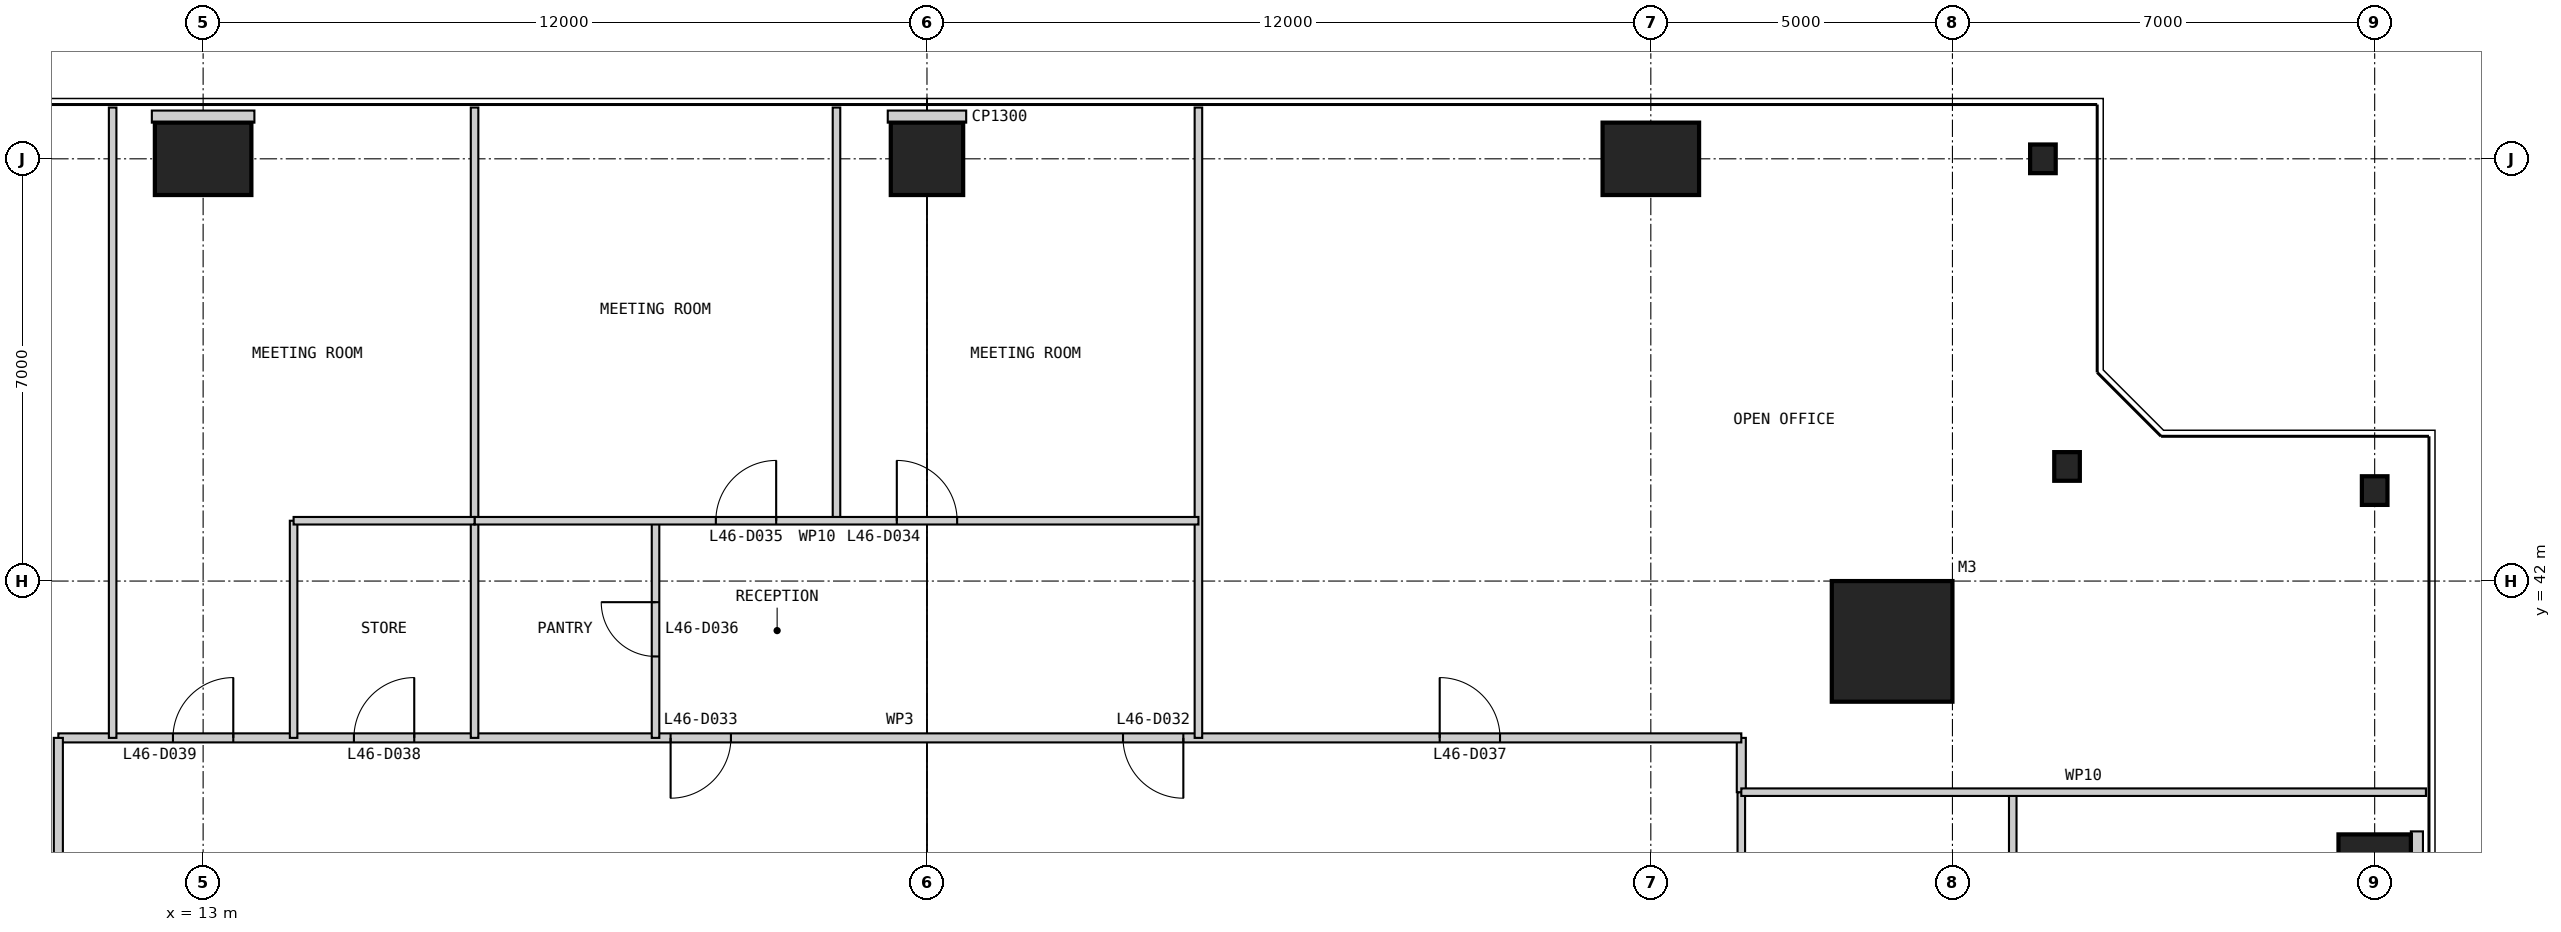
"""IFC4 building model, lengths in metres.
Left out: names, types, materials, properties, quantities, classifications, styles, units other than length and angle.
Written with IfcOpenShell. Run it as: python <this file> out.ifc"""

import sys

from ifc_helpers import new_model, si_unit, direction, frame, frame_2d, origin, origin_2d, place, context, subcontext, project, spatial, rectangle, i_section, extrude, element, fill, save


model = new_model("IFC4")
c1 = context("Model", 3, precision=1e-05, world=origin(), true_north=direction((0.0, 1.0)))
c2 = subcontext(c1, "Body", "Model", "MODEL_VIEW")
j1 = project(units=[si_unit("LENGTHUNIT", "METRE"), si_unit("PLANEANGLEUNIT", "RADIAN")], contexts=[c1])
p1 = place(None, origin())
s1 = spatial("IfcSite", under=j1, at=p1, CompositionType="ELEMENT")
p2 = place(p1, origin())
s2 = spatial("IfcBuilding", under=s1, at=p2, CompositionType="ELEMENT")
p3 = place(p2, frame((0.0, 0.0, 197.8)))
s3 = spatial("IfcBuildingStorey", under=s2, at=p3, CompositionType="ELEMENT", Elevation=197.8)
p4 = place(p3, frame((41.0, 41.0, 0.0), z_axis=(0.0, 0.0, 1.0), x_axis=(1.0, 0.0, 0.0)))
e1 = element("IfcColumn", 1, at=p4, inside=s3, PredefinedType="COLUMN", context=c2, shape_type="SweptSolid", body=[
    extrude(rectangle(XDim=2.0, YDim=2.0, at=origin_2d()), origin(), (0.0, 0.0, 1.0), 4.0),
])
p5 = place(p3, frame((49.0, 37.0, 0.0), z_axis=(0.0, 0.0, 1.0), x_axis=(1.0, 0.0, 0.0)))
e2 = element("IfcColumn", 2, at=p5, inside=s3, PredefinedType="COLUMN", context=c2, shape_type="SweptSolid", body=[
    extrude(rectangle(XDim=1.2, YDim=1.6, at=origin_2d()), origin(), (0.0, 0.0, 1.0), 4.0),
])
for number, where, z_axis, x_axis in (
    (3, (49.0, 43.5, 0.0), (0.0, 0.0, 1.0), (1.0, 0.0, 0.0)),
    (4, (43.9, 43.9, 0.0), (0.0, 0.0, 1.0), (1.0, 0.0, 0.0)),
    (5, (43.5, 49.0, 0.0), (0.0, 0.0, 1.0), (1.0, 0.0, 0.0)),
):
    element("IfcColumn", number, at=place(p3, frame(where, z_axis=z_axis, x_axis=x_axis)), inside=s3, PredefinedType="COLUMN", context=c2, shape_type="SweptSolid", body=[
        extrude(i_section(OverallWidth=0.424, OverallDepth=0.475, WebThickness=0.048, FlangeThickness=0.077, at=origin_2d()), origin(), (0.0, 0.0, 1.0), 4.0),
    ])
p6 = place(p3, frame((37.0, 49.0, 0.0), z_axis=(0.0, 0.0, 1.0), x_axis=(1.0, 0.0, 0.0)))
e6 = element("IfcColumn", 6, at=p6, inside=s3, PredefinedType="COLUMN", context=c2, shape_type="SweptSolid", body=[
    extrude(rectangle(XDim=1.6, YDim=1.2, at=origin_2d()), origin(), (0.0, 0.0, 1.0), 4.0),
])
p7 = place(p3, frame((25.0, 49.0, 0.0), z_axis=(0.0, 0.0, 1.0), x_axis=(1.0, 0.0, 0.0)))
e7 = element("IfcColumn", 7, at=p7, inside=s3, PredefinedType="COLUMN", context=c2, shape_type="SweptSolid", body=[
    extrude(rectangle(XDim=1.2, YDim=1.2, at=origin_2d()), origin(), (0.0, 0.0, 1.0), 4.0),
])
p8 = place(p3, frame((13.0, 49.0, 0.0), z_axis=(0.0, 0.0, 1.0), x_axis=(1.0, 0.0, 0.0)))
e8 = element("IfcColumn", 8, at=p8, inside=s3, PredefinedType="COLUMN", context=c2, shape_type="SweptSolid", body=[
    extrude(rectangle(XDim=1.6, YDim=1.2, at=origin_2d()), origin(), (0.0, 0.0, 1.0), 4.0),
])
p9 = place(p3, frame((43.0, 32.5, 0.0), z_axis=(0.0, 0.0, 1.0), x_axis=(0.0, 1.0, 0.0)))
e9 = element("IfcWall", 9, at=p9, inside=s3, PredefinedType="PARTITIONING", context=c2, shape_type="SweptSolid", body=[
    extrude(rectangle(XDim=6.0, YDim=0.125, at=frame_2d((3.0, 0.0))), origin(), (0.0, 0.0, 1.0), 3.238),
])
p10 = place(p3, frame((38.5, 35.5, 0.0), z_axis=(0.0, 0.0, 1.0), x_axis=(0.0, 1.0, 0.0)))
e10 = element("IfcWall", 10, at=p10, inside=s3, PredefinedType="PARTITIONING", context=c2, shape_type="SweptSolid", body=[
    extrude(rectangle(XDim=3.0, YDim=0.125, at=frame_2d((1.5, 0.0))), origin(), (0.0, 0.0, 1.0), 3.85),
])
p11 = place(p3, frame((38.5, 38.5, 0.0), z_axis=(0.0, 0.0, 1.0), x_axis=(0.0, 1.0, 0.0)))
e11 = element("IfcWall", 11, at=p11, inside=s3, PredefinedType="PARTITIONING", context=c2, shape_type="SweptSolid", body=[
    extrude(rectangle(XDim=0.9, YDim=0.15, at=frame_2d((0.45, 0.0))), origin(), (0.0, 0.0, 1.0), 3.85),
])
p12 = place(p3, frame((38.5, 39.4, 0.0), z_axis=(0.0, 0.0, 1.0), x_axis=(-1.0, 0.0, 0.0)))
e12 = element("IfcWall", 12, at=p12, inside=s3, PredefinedType="PARTITIONING", context=c2, shape_type="SweptSolid", body=[
    extrude(rectangle(XDim=27.9, YDim=0.15, at=frame_2d((13.95, 0.0))), origin(), (0.0, 0.0, 1.0), 3.85),
])
p13 = place(p12, frame((9.25, 0.0, 0.0)))
e13 = element("IfcOpeningElement", 13, at=p13, cuts=e12, PredefinedType="OPENING", context=c2, shape_type="SweptSolid", body=[
    extrude(rectangle(XDim=1.0, YDim=2.2, at=frame_2d((0.5, 1.1))), frame((0.0, 0.085, 0.0), z_axis=(0.0, -1.0, 0.0), x_axis=(1.0, 0.0, 0.0)), (0.0, 0.0, 1.0), 0.17),
])
p14 = place(p12, frame((16.75, 0.0, 0.0)))
e14 = element("IfcOpeningElement", 14, at=p14, cuts=e12, PredefinedType="OPENING", context=c2, shape_type="SweptSolid", body=[
    extrude(rectangle(XDim=1.0, YDim=2.2, at=frame_2d((0.5, 1.1))), frame((0.0, 0.085, 0.0), z_axis=(0.0, -1.0, 0.0), x_axis=(1.0, 0.0, 0.0)), (0.0, 0.0, 1.0), 0.17),
])
p15 = place(p12, frame((4.0, 0.0, 0.0)))
e15 = element("IfcOpeningElement", 15, at=p15, cuts=e12, PredefinedType="OPENING", context=c2, shape_type="SweptSolid", body=[
    extrude(rectangle(XDim=1.0, YDim=2.2, at=frame_2d((0.5, 1.1))), frame((0.0, 0.085, 0.0), z_axis=(0.0, -1.0, 0.0), x_axis=(1.0, 0.0, 0.0)), (0.0, 0.0, 1.0), 0.17),
])
p16 = place(p12, frame((22.0, 0.0, 0.0)))
e16 = element("IfcOpeningElement", 16, at=p16, cuts=e12, PredefinedType="OPENING", context=c2, shape_type="SweptSolid", body=[
    extrude(rectangle(XDim=1.0, YDim=2.2, at=frame_2d((0.5, 1.1))), frame((0.0, 0.085, 0.0), z_axis=(0.0, -1.0, 0.0), x_axis=(1.0, 0.0, 0.0)), (0.0, 0.0, 1.0), 0.17),
])
p17 = place(p12, frame((25.0, 0.0, 0.0)))
e17 = element("IfcOpeningElement", 17, at=p17, cuts=e12, PredefinedType="OPENING", context=c2, shape_type="SweptSolid", body=[
    extrude(rectangle(XDim=1.0, YDim=2.2, at=frame_2d((0.5, 1.1))), frame((0.0, 0.085, 0.0), z_axis=(0.0, -1.0, 0.0), x_axis=(1.0, 0.0, 0.0)), (0.0, 0.0, 1.0), 0.17),
])
p18 = place(p3, frame((49.85, 38.5, 0.0), z_axis=(0.0, 0.0, 1.0), x_axis=(-1.0, 0.0, 0.0)))
e18 = element("IfcWall", 18, at=p18, inside=s3, PredefinedType="PARTITIONING", context=c2, shape_type="SweptSolid", body=[
    extrude(rectangle(XDim=11.35, YDim=0.125, at=frame_2d((5.675, 0.0))), origin(), (0.0, 0.0, 1.0), 3.85),
])
p19 = place(p3, frame((29.5, 49.85, 0.0), z_axis=(0.0, 0.0, 1.0), x_axis=(0.0, -1.0, 0.0)))
e19 = element("IfcWall", 19, at=p19, inside=s3, PredefinedType="PARTITIONING", context=c2, shape_type="SweptSolid", body=[
    extrude(rectangle(XDim=10.45, YDim=0.125, at=frame_2d((5.225, 0.0))), origin(), (0.0, 0.0, 1.0), 3.85),
])
p20 = place(p3, frame((23.5, 49.85, 0.0), z_axis=(0.0, 0.0, 1.0), x_axis=(0.0, -1.0, 0.0)))
e20 = element("IfcWall", 20, at=p20, inside=s3, PredefinedType="PARTITIONING", context=c2, shape_type="SweptSolid", body=[
    extrude(rectangle(XDim=6.85, YDim=0.125, at=frame_2d((3.425, 0.0))), origin(), (0.0, 0.0, 1.0), 3.85),
])
p21 = place(p3, frame((20.5, 43.0, 0.0), z_axis=(0.0, 0.0, 1.0), x_axis=(0.0, -1.0, 0.0)))
e21 = element("IfcWall", 21, at=p21, inside=s3, PredefinedType="PARTITIONING", context=c2, shape_type="SweptSolid", body=[
    extrude(rectangle(XDim=3.6, YDim=0.125, at=frame_2d((1.8, 0.0))), origin(), (0.0, 0.0, 1.0), 3.85),
])
p22 = place(p21, frame((1.35, 0.0, 0.0)))
e22 = element("IfcOpeningElement", 22, at=p22, cuts=e21, PredefinedType="OPENING", context=c2, shape_type="SweptSolid", body=[
    extrude(rectangle(XDim=0.9, YDim=2.2, at=frame_2d((0.45, 1.1))), frame((0.0, 0.073, 0.0), z_axis=(0.0, -1.0, 0.0), x_axis=(1.0, 0.0, 0.0)), (0.0, 0.0, 1.0), 0.145),
])
p23 = place(p3, frame((17.5, 49.85, 0.0), z_axis=(0.0, 0.0, 1.0), x_axis=(0.0, -1.0, 0.0)))
e23 = element("IfcWall", 23, at=p23, inside=s3, PredefinedType="PARTITIONING", context=c2, shape_type="SweptSolid", body=[
    extrude(rectangle(XDim=10.45, YDim=0.125, at=frame_2d((5.225, 0.0))), origin(), (0.0, 0.0, 1.0), 3.85),
])
p24 = place(p3, frame((14.5, 43.0, 0.0), z_axis=(0.0, 0.0, 1.0), x_axis=(0.0, -1.0, 0.0)))
e24 = element("IfcWall", 24, at=p24, inside=s3, PredefinedType="PARTITIONING", context=c2, shape_type="SweptSolid", body=[
    extrude(rectangle(XDim=3.6, YDim=0.125, at=frame_2d((1.8, 0.0))), origin(), (0.0, 0.0, 1.0), 3.85),
])
p25 = place(p3, frame((29.5, 43.0, 0.0), z_axis=(0.0, 0.0, 1.0), x_axis=(-1.0, 0.0, 0.0)))
e25 = element("IfcWall", 25, at=p25, inside=s3, PredefinedType="PARTITIONING", context=c2, shape_type="SweptSolid", body=[
    extrude(rectangle(XDim=12.0, YDim=0.125, at=frame_2d((6.0, 0.0))), origin(), (0.0, 0.0, 1.0), 3.85),
])
p26 = place(p25, frame((4.0, 0.0, 0.0)))
e26 = element("IfcOpeningElement", 26, at=p26, cuts=e25, PredefinedType="OPENING", context=c2, shape_type="SweptSolid", body=[
    extrude(rectangle(XDim=1.0, YDim=2.2, at=frame_2d((0.5, 1.1))), frame((0.0, 0.073, 0.0), z_axis=(0.0, -1.0, 0.0), x_axis=(1.0, 0.0, 0.0)), (0.0, 0.0, 1.0), 0.145),
])
p27 = place(p25, frame((7.0, 0.0, 0.0)))
e27 = element("IfcOpeningElement", 27, at=p27, cuts=e25, PredefinedType="OPENING", context=c2, shape_type="SweptSolid", body=[
    extrude(rectangle(XDim=1.0, YDim=2.2, at=frame_2d((0.5, 1.1))), frame((0.0, 0.073, 0.0), z_axis=(0.0, -1.0, 0.0), x_axis=(1.0, 0.0, 0.0)), (0.0, 0.0, 1.0), 0.145),
])
p28 = place(p3, frame((17.5, 43.0, 0.0), z_axis=(0.0, 0.0, 1.0), x_axis=(-1.0, 0.0, 0.0)))
e28 = element("IfcWall", 28, at=p28, inside=s3, PredefinedType="PARTITIONING", context=c2, shape_type="SweptSolid", body=[
    extrude(rectangle(XDim=3.0, YDim=0.125, at=frame_2d((1.5, 0.0))), origin(), (0.0, 0.0, 1.0), 3.85),
])
p29 = place(p3, frame((10.6, 39.4, 0.0), z_axis=(0.0, 0.0, 1.0), x_axis=(0.0, -1.0, 0.0)))
e29 = element("IfcWall", 29, at=p29, inside=s3, PredefinedType="PARTITIONING", context=c2, shape_type="SweptSolid", body=[
    extrude(rectangle(XDim=28.8, YDim=0.15, at=frame_2d((14.4, 0.0))), origin(), (0.0, 0.0, 1.0), 3.85),
])
p30 = place(p29, frame((10.15, 0.0, 0.0)))
e30 = element("IfcOpeningElement", 30, at=p30, cuts=e29, PredefinedType="OPENING", context=c2, shape_type="SweptSolid", body=[
    extrude(rectangle(XDim=1.0, YDim=2.2, at=frame_2d((0.5, 1.1))), frame((0.0, 0.085, 0.0), z_axis=(0.0, -1.0, 0.0), x_axis=(1.0, 0.0, 0.0)), (0.0, 0.0, 1.0), 0.17),
])
p31 = place(p29, frame((17.65, 0.0, 0.0)))
e31 = element("IfcOpeningElement", 31, at=p31, cuts=e29, PredefinedType="OPENING", context=c2, shape_type="SweptSolid", body=[
    extrude(rectangle(XDim=1.0, YDim=2.2, at=frame_2d((0.5, 1.1))), frame((0.0, 0.085, 0.0), z_axis=(0.0, -1.0, 0.0), x_axis=(1.0, 0.0, 0.0)), (0.0, 0.0, 1.0), 0.17),
])
p32 = place(p29, frame((4.9, 0.0, 0.0)))
e32 = element("IfcOpeningElement", 32, at=p32, cuts=e29, PredefinedType="OPENING", context=c2, shape_type="SweptSolid", body=[
    extrude(rectangle(XDim=1.0, YDim=2.2, at=frame_2d((0.5, 1.1))), frame((0.0, 0.085, 0.0), z_axis=(0.0, -1.0, 0.0), x_axis=(1.0, 0.0, 0.0)), (0.0, 0.0, 1.0), 0.17),
])
p33 = place(p29, frame((22.9, 0.0, 0.0)))
e33 = element("IfcOpeningElement", 33, at=p33, cuts=e29, PredefinedType="OPENING", context=c2, shape_type="SweptSolid", body=[
    extrude(rectangle(XDim=1.0, YDim=2.2, at=frame_2d((0.5, 1.1))), frame((0.0, 0.085, 0.0), z_axis=(0.0, -1.0, 0.0), x_axis=(1.0, 0.0, 0.0)), (0.0, 0.0, 1.0), 0.17),
])
p34 = place(p29, frame((25.9, 0.0, 0.0)))
e34 = element("IfcOpeningElement", 34, at=p34, cuts=e29, PredefinedType="OPENING", context=c2, shape_type="SweptSolid", body=[
    extrude(rectangle(XDim=1.0, YDim=2.2, at=frame_2d((0.5, 1.1))), frame((0.0, 0.085, 0.0), z_axis=(0.0, -1.0, 0.0), x_axis=(1.0, 0.0, 0.0)), (0.0, 0.0, 1.0), 0.17),
])
p35 = place(p3, frame((11.5, 49.85, 0.0), z_axis=(0.0, 0.0, 1.0), x_axis=(0.0, -1.0, 0.0)))
e35 = element("IfcWall", 35, at=p35, inside=s3, PredefinedType="PARTITIONING", context=c2, shape_type="SweptSolid", body=[
    extrude(rectangle(XDim=10.45, YDim=0.125, at=frame_2d((5.225, 0.0))), origin(), (0.0, 0.0, 1.0), 3.85),
])
p36 = place(p3, frame((49.8, 37.0, 0.0), z_axis=(0.0, 0.0, 1.0), x_axis=(-1.0, 0.0, 0.0)))
e36 = element("IfcWall", 36, at=p36, inside=s3, PredefinedType="PARTITIONING", context=c2, shape_type="SweptSolid", body=[
    extrude(rectangle(XDim=0.2, YDim=1.7, at=frame_2d((0.1, 0.0))), origin(), (0.0, 0.0, 1.0), 3.85),
])
p37 = place(p3, frame((25.0, 49.8, 0.0), z_axis=(0.0, 0.0, 1.0), x_axis=(0.0, -1.0, 0.0)))
e37 = element("IfcWall", 37, at=p37, inside=s3, PredefinedType="PARTITIONING", context=c2, shape_type="SweptSolid", body=[
    extrude(rectangle(XDim=0.2, YDim=1.3, at=frame_2d((0.1, 0.0))), origin(), (0.0, 0.0, 1.0), 3.85),
])
p38 = place(p3, frame((13.0, 49.8, 0.0), z_axis=(0.0, 0.0, 1.0), x_axis=(0.0, -1.0, 0.0)))
e38 = element("IfcWall", 38, at=p38, inside=s3, PredefinedType="PARTITIONING", context=c2, shape_type="SweptSolid", body=[
    extrude(rectangle(XDim=0.2, YDim=1.7, at=frame_2d((0.1, 0.0))), origin(), (0.0, 0.0, 1.0), 3.85),
])
p39 = place(p13, origin())
e39 = element("IfcDoor", 39, at=p39, inside=s3, OperationType="SINGLE_SWING_LEFT", PredefinedType="DOOR", context=c2, shape_type="SweptSolid", body=[
    extrude(rectangle(XDim=1.0, YDim=2.2, at=frame_2d((0.5, 1.1))), frame((0.0, 0.025, 0.0), z_axis=(0.0, -1.0, 0.0), x_axis=(1.0, 0.0, 0.0)), (0.0, 0.0, 1.0), 0.05),
])
fill(e13, e39)
p40 = place(p14, origin())
e40 = element("IfcDoor", 40, at=p40, inside=s3, OperationType="SINGLE_SWING_RIGHT", PredefinedType="DOOR", context=c2, shape_type="SweptSolid", body=[
    extrude(rectangle(XDim=1.0, YDim=2.2, at=frame_2d((0.5, 1.1))), frame((0.0, 0.025, 0.0), z_axis=(0.0, -1.0, 0.0), x_axis=(1.0, 0.0, 0.0)), (0.0, 0.0, 1.0), 0.05),
])
fill(e14, e40)
p41 = place(p26, frame((1.0, 0.0, 0.0), z_axis=(0.0, 0.0, 1.0), x_axis=(-1.0, 0.0, 0.0)))
e41 = element("IfcDoor", 41, at=p41, inside=s3, OperationType="SINGLE_SWING_LEFT", PredefinedType="DOOR", context=c2, shape_type="SweptSolid", body=[
    extrude(rectangle(XDim=1.0, YDim=2.2, at=frame_2d((0.5, 1.1))), frame((0.0, 0.025, 0.0), z_axis=(0.0, -1.0, 0.0), x_axis=(1.0, 0.0, 0.0)), (0.0, 0.0, 1.0), 0.05),
])
fill(e26, e41)
p42 = place(p27, frame((1.0, 0.0, 0.0), z_axis=(0.0, 0.0, 1.0), x_axis=(-1.0, 0.0, 0.0)))
e42 = element("IfcDoor", 42, at=p42, inside=s3, OperationType="SINGLE_SWING_RIGHT", PredefinedType="DOOR", context=c2, shape_type="SweptSolid", body=[
    extrude(rectangle(XDim=1.0, YDim=2.2, at=frame_2d((0.5, 1.1))), frame((0.0, 0.025, 0.0), z_axis=(0.0, -1.0, 0.0), x_axis=(1.0, 0.0, 0.0)), (0.0, 0.0, 1.0), 0.05),
])
fill(e27, e42)
p43 = place(p22, frame((0.9, 0.0, 0.0), z_axis=(0.0, 0.0, 1.0), x_axis=(-1.0, 0.0, 0.0)))
e43 = element("IfcDoor", 43, at=p43, inside=s3, OperationType="SINGLE_SWING_RIGHT", PredefinedType="DOOR", context=c2, shape_type="SweptSolid", body=[
    extrude(rectangle(XDim=0.9, YDim=2.2, at=frame_2d((0.45, 1.1))), frame((0.0, 0.025, 0.0), z_axis=(0.0, -1.0, 0.0), x_axis=(1.0, 0.0, 0.0)), (0.0, 0.0, 1.0), 0.05),
])
fill(e22, e43)
p44 = place(p15, frame((1.0, 0.0, 0.0), z_axis=(0.0, 0.0, 1.0), x_axis=(-1.0, 0.0, 0.0)))
e44 = element("IfcDoor", 44, at=p44, inside=s3, OperationType="SINGLE_SWING_LEFT", PredefinedType="DOOR", context=c2, shape_type="SweptSolid", body=[
    extrude(rectangle(XDim=1.0, YDim=2.2, at=frame_2d((0.5, 1.1))), frame((0.0, 0.025, 0.0), z_axis=(0.0, -1.0, 0.0), x_axis=(1.0, 0.0, 0.0)), (0.0, 0.0, 1.0), 0.05),
])
fill(e15, e44)
p45 = place(p16, frame((1.0, 0.0, 0.0), z_axis=(0.0, 0.0, 1.0), x_axis=(-1.0, 0.0, 0.0)))
e45 = element("IfcDoor", 45, at=p45, inside=s3, OperationType="SINGLE_SWING_RIGHT", PredefinedType="DOOR", context=c2, shape_type="SweptSolid", body=[
    extrude(rectangle(XDim=1.0, YDim=2.2, at=frame_2d((0.5, 1.1))), frame((0.0, 0.025, 0.0), z_axis=(0.0, -1.0, 0.0), x_axis=(1.0, 0.0, 0.0)), (0.0, 0.0, 1.0), 0.05),
])
fill(e16, e45)
p46 = place(p17, frame((1.0, 0.0, 0.0), z_axis=(0.0, 0.0, 1.0), x_axis=(-1.0, 0.0, 0.0)))
e46 = element("IfcDoor", 46, at=p46, inside=s3, OperationType="SINGLE_SWING_RIGHT", PredefinedType="DOOR", context=c2, shape_type="SweptSolid", body=[
    extrude(rectangle(XDim=1.0, YDim=2.2, at=frame_2d((0.5, 1.1))), frame((0.0, 0.025, 0.0), z_axis=(0.0, -1.0, 0.0), x_axis=(1.0, 0.0, 0.0)), (0.0, 0.0, 1.0), 0.05),
])
fill(e17, e46)
save(model, sys.argv[1])
